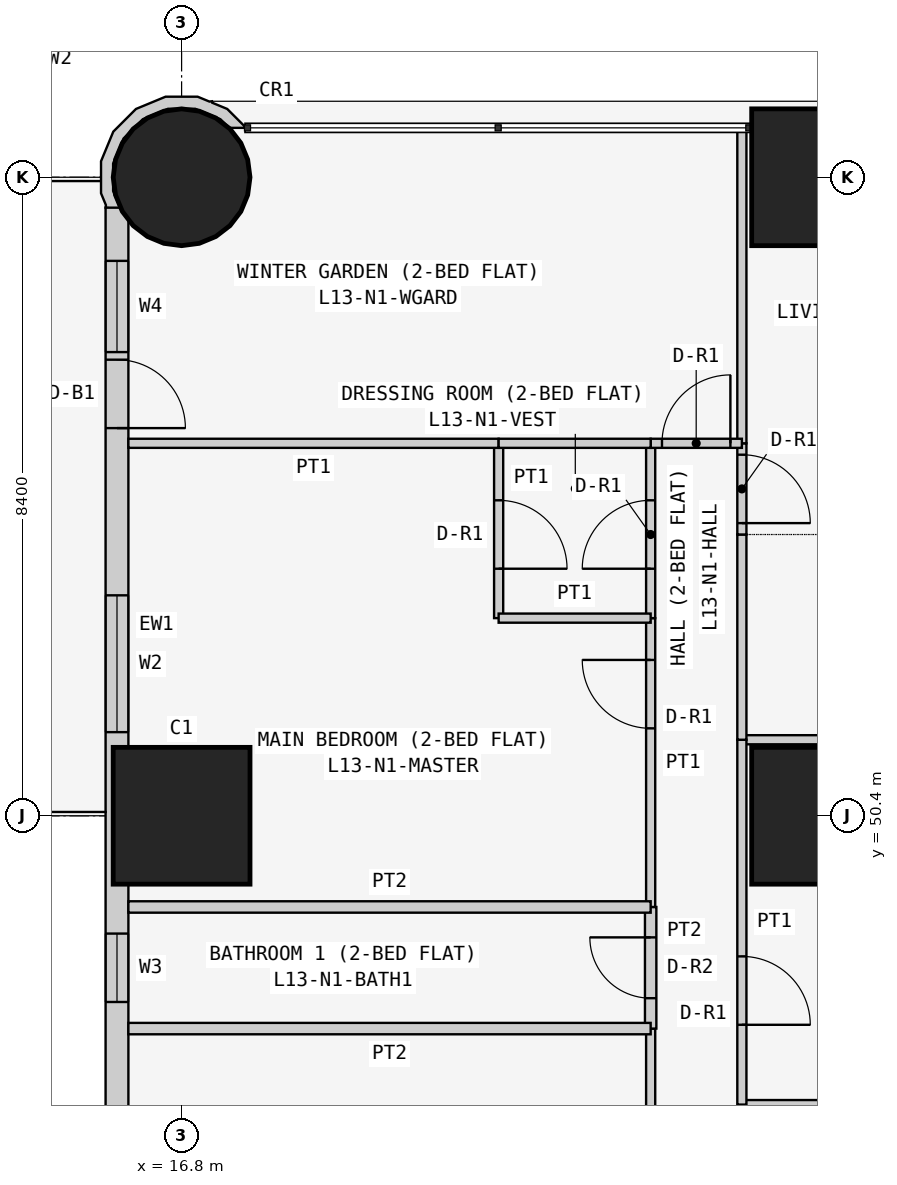
"""IFC4 building model, lengths in metres.
Left out: names, types, materials, properties, quantities, classifications, styles, units other than length and angle.
Written with IfcOpenShell. Run it as: python <this file> out.ifc"""

import sys

from ifc_helpers import new_model, si_unit, direction, frame, frame_2d, origin, origin_2d, place, context, subcontext, project, spatial, polyline, rectangle, circle, outline, extrude, element, fill, save


model = new_model("IFC4")
c1 = context("Model", 3, precision=1e-05, world=origin(), true_north=direction((0.0, 1.0)))
c2 = subcontext(c1, "Body", "Model", "MODEL_VIEW")
j1 = project(units=[si_unit("LENGTHUNIT", "METRE"), si_unit("PLANEANGLEUNIT", "RADIAN")], contexts=[c1])
p1 = place(None, origin())
s1 = spatial("IfcSite", under=j1, at=p1, CompositionType="ELEMENT")
p2 = place(p1, origin())
s2 = spatial("IfcBuilding", under=s1, at=p2, CompositionType="ELEMENT")
p3 = place(p2, frame((0.0, 0.0, 56.1)))
s3 = spatial("IfcBuildingStorey", under=s2, at=p3, CompositionType="ELEMENT", Elevation=56.1)
p4 = place(p3, frame((16.8, 50.4, 0.0), z_axis=(0.0, 0.0, 1.0), x_axis=(1.0, 0.0, 0.0)))
e1 = element("IfcColumn", 1, at=p4, inside=s3, PredefinedType="COLUMN", context=c2, shape_type="SweptSolid", body=[
    extrude(rectangle(XDim=1.8, YDim=1.8, at=origin_2d()), origin(), (0.0, 0.0, 1.0), 3.6),
])
p5 = place(p3, frame((16.8, 58.8, 0.0), z_axis=(0.0, 0.0, 1.0), x_axis=(1.0, 0.0, 0.0)))
e2 = element("IfcColumn", 2, at=p5, inside=s3, PredefinedType="COLUMN", context=c2, shape_type="SweptSolid", body=[
    extrude(circle(Radius=0.9, at=origin_2d()), origin(), (0.0, 0.0, 1.0), 3.6),
])
for number, where, z_axis, x_axis in (
    (3, (25.2, 50.4, 0.0), (0.0, 0.0, 1.0), (1.0, 0.0, 0.0)),
    (4, (25.2, 58.8, 0.0), (0.0, 0.0, 1.0), (1.0, 0.0, 0.0)),
):
    element("IfcColumn", number, at=place(p3, frame(where, z_axis=z_axis, x_axis=x_axis)), inside=s3, PredefinedType="COLUMN", context=c2, shape_type="SweptSolid", body=[
        extrude(rectangle(XDim=1.8, YDim=1.8, at=origin_2d()), origin(), (0.0, 0.0, 1.0), 3.6),
    ])
p6 = place(p3, frame((15.95, 58.4, 0.0), z_axis=(0.0, 0.0, 1.0), x_axis=(0.0, -1.0, 0.0)))
e5 = element("IfcWall", 5, at=p6, inside=s3, PredefinedType="SOLIDWALL", context=c2, shape_type="SweptSolid", body=[
    extrude(rectangle(XDim=15.7, YDim=0.3, at=frame_2d((7.85, 0.0))), origin(), (0.0, 0.0, 1.0), 3.45),
])
p7 = place(p6, frame((12.4, 0.0, 0.9)))
e6 = element("IfcOpeningElement", 6, at=p7, cuts=e5, PredefinedType="OPENING", context=c2, shape_type="SweptSolid", body=[
    extrude(rectangle(XDim=1.8, YDim=1.5, at=frame_2d((0.9, 0.75))), frame((0.0, 0.16, 0.0), z_axis=(0.0, -1.0, 0.0), x_axis=(1.0, 0.0, 0.0)), (0.0, 0.0, 1.0), 0.32),
])
p8 = place(p6, frame((9.55, 0.0, 1.5)))
e7 = element("IfcOpeningElement", 7, at=p8, cuts=e5, PredefinedType="OPENING", context=c2, shape_type="SweptSolid", body=[
    extrude(rectangle(XDim=0.9, YDim=0.7, at=frame_2d((0.45, 0.35))), frame((0.0, 0.16, 0.0), z_axis=(0.0, -1.0, 0.0), x_axis=(1.0, 0.0, 0.0)), (0.0, 0.0, 1.0), 0.32),
])
p9 = place(p6, frame((5.1, 0.0, 0.9)))
e8 = element("IfcOpeningElement", 8, at=p9, cuts=e5, PredefinedType="OPENING", context=c2, shape_type="SweptSolid", body=[
    extrude(rectangle(XDim=1.8, YDim=1.5, at=frame_2d((0.9, 0.75))), frame((0.0, 0.16, 0.0), z_axis=(0.0, -1.0, 0.0), x_axis=(1.0, 0.0, 0.0)), (0.0, 0.0, 1.0), 0.32),
])
p10 = place(p6, frame((2.0, 0.0, 0.0)))
e9 = element("IfcOpeningElement", 9, at=p10, cuts=e5, PredefinedType="OPENING", context=c2, shape_type="SweptSolid", body=[
    extrude(rectangle(XDim=0.9, YDim=2.4, at=frame_2d((0.45, 1.2))), frame((0.0, 0.16, 0.0), z_axis=(0.0, -1.0, 0.0), x_axis=(1.0, 0.0, 0.0)), (0.0, 0.0, 1.0), 0.32),
])
p11 = place(p6, frame((0.7, 0.0, 0.9)))
e10 = element("IfcOpeningElement", 10, at=p11, cuts=e5, PredefinedType="OPENING", context=c2, shape_type="SweptSolid", body=[
    extrude(rectangle(XDim=1.2, YDim=1.5, at=frame_2d((0.6, 0.75))), frame((0.0, 0.16, 0.0), z_axis=(0.0, -1.0, 0.0), x_axis=(1.0, 0.0, 0.0)), (0.0, 0.0, 1.0), 0.32),
])
p12 = place(p3, frame((17.567, 59.411, 0.0), z_axis=(0.0, 0.0, 1.0), x_axis=(-0.377204953059, 0.926129809145, 0.0)))
e11 = element("IfcWall", 11, at=p12, inside=s3, PredefinedType="SOLIDWALL", context=c2, shape_type="SweptSolid", body=[
    extrude(outline(polyline([(-0.27, 2.017), (-0.37, 1.841), (-0.102, 1.842), (0.23, 1.707), (0.484, 1.455), (0.624, 1.125), (0.626, 0.766), (0.491, 0.434), (0.239, 0.18), (0.09, 0.117), (0.011, -0.078), (0.024, -0.083), (0.329, 0.045), (0.48, 0.198), (0.499, 0.193), (0.508, 0.225), (0.626, 0.345), (0.785, 0.736), (0.782, 1.157), (0.619, 1.546), (0.319, 1.842), (-0.072, 2.002), (-0.24, 2.0), (-0.27, 2.017)])), origin(), (0.0, 0.0, 1.0), 3.45),
])
for number, where, z_axis, x_axis in (
    (12, (29.4, 46.6, 0.0), (0.0, 0.0, 1.0), (-1.0, 0.0, 0.0)),
    (13, (29.4, 51.4, 0.0), (0.0, 0.0, 1.0), (-1.0, 0.0, 0.0)),
):
    element("IfcWall", number, at=place(p3, frame(where, z_axis=z_axis, x_axis=x_axis)), inside=s3, PredefinedType="PARTITIONING", context=c2, shape_type="SweptSolid", body=[
        extrude(rectangle(XDim=5.229, YDim=0.12, at=frame_2d((2.615, 0.0))), origin(), (0.0, 0.0, 1.0), 3.45),
    ])
p13 = place(p3, frame((24.171, 51.4, 0.0), z_axis=(0.0, 0.0, 1.0), x_axis=(0.0, -1.0, 0.0)))
e14 = element("IfcWall", 14, at=p13, inside=s3, PredefinedType="PARTITIONING", context=c2, shape_type="SweptSolid", body=[
    extrude(rectangle(XDim=4.8, YDim=0.12, at=frame_2d((2.4, 0.0))), origin(), (0.0, 0.0, 1.0), 3.45),
])
p14 = place(p13, frame((2.85, 0.0, 0.0)))
e15 = element("IfcOpeningElement", 15, at=p14, cuts=e14, PredefinedType="OPENING", context=c2, shape_type="SweptSolid", body=[
    extrude(rectangle(XDim=0.9, YDim=2.1, at=frame_2d((0.45, 1.05))), frame((0.0, 0.07, 0.0), z_axis=(0.0, -1.0, 0.0), x_axis=(1.0, 0.0, 0.0)), (0.0, 0.0, 1.0), 0.14),
])
p15 = place(p3, frame((24.171, 54.1, 0.0), z_axis=(0.0, 0.0, 1.0), x_axis=(0.0, -1.0, 0.0)))
e16 = element("IfcWall", 16, at=p15, inside=s3, PredefinedType="PARTITIONING", context=c2, shape_type="SweptSolid", body=[
    extrude(rectangle(XDim=2.7, YDim=0.12, at=frame_2d((1.35, 0.0))), origin(), (0.0, 0.0, 1.0), 3.45),
])
p16 = place(p3, frame((24.171, 55.3, 0.0), z_axis=(0.0, 0.0, 1.0), x_axis=(0.0, -1.0, 0.0)))
e17 = element("IfcWall", 17, at=p16, inside=s3, PredefinedType="PARTITIONING", context=c2, shape_type="SweptSolid", body=[
    extrude(rectangle(XDim=1.2, YDim=0.12, at=frame_2d((0.6, 0.0))), origin(), (0.0, 0.0, 1.0), 3.45),
])
p17 = place(p16, frame((0.15, 0.0, 0.0)))
e18 = element("IfcOpeningElement", 18, at=p17, cuts=e17, PredefinedType="OPENING", context=c2, shape_type="SweptSolid", body=[
    extrude(rectangle(XDim=0.9, YDim=2.1, at=frame_2d((0.45, 1.05))), frame((0.0, 0.07, 0.0), z_axis=(0.0, -1.0, 0.0), x_axis=(1.0, 0.0, 0.0)), (0.0, 0.0, 1.0), 0.14),
])
p18 = place(p3, frame((24.171, 59.45, 0.0), z_axis=(0.0, 0.0, 1.0), x_axis=(0.0, -1.0, 0.0)))
e19 = element("IfcWall", 19, at=p18, inside=s3, PredefinedType="PARTITIONING", context=c2, shape_type="SweptSolid", body=[
    extrude(rectangle(XDim=4.15, YDim=0.12, at=frame_2d((2.075, 0.0))), origin(), (0.0, 0.0, 1.0), 3.45),
])
p19 = place(p3, frame((22.971, 47.6, 0.0), z_axis=(0.0, 0.0, 1.0), x_axis=(0.0, -1.0, 0.0)))
e20 = element("IfcWall", 20, at=p19, inside=s3, PredefinedType="PARTITIONING", context=c2, shape_type="SweptSolid", body=[
    extrude(rectangle(XDim=4.575, YDim=0.12, at=frame_2d((2.288, 0.0))), origin(), (0.0, 0.0, 1.0), 3.45),
])
p20 = place(p19, frame((1.85, 0.0, 0.0)))
e21 = element("IfcOpeningElement", 21, at=p20, cuts=e20, PredefinedType="OPENING", context=c2, shape_type="SweptSolid", body=[
    extrude(rectangle(XDim=0.9, YDim=2.1, at=frame_2d((0.45, 1.05))), frame((0.0, 0.07, 0.0), z_axis=(0.0, -1.0, 0.0), x_axis=(1.0, 0.0, 0.0)), (0.0, 0.0, 1.0), 0.14),
])
p21 = place(p3, frame((22.971, 49.2, 0.0), z_axis=(0.0, 0.0, 1.0), x_axis=(0.0, -1.0, 0.0)))
e22 = element("IfcWall", 22, at=p21, inside=s3, PredefinedType="PARTITIONING", context=c2, shape_type="SweptSolid", body=[
    extrude(rectangle(XDim=1.6, YDim=0.15, at=frame_2d((0.8, 0.0))), origin(), (0.0, 0.0, 1.0), 3.45),
])
p22 = place(p21, frame((0.4, 0.0, 0.0)))
e23 = element("IfcOpeningElement", 23, at=p22, cuts=e22, PredefinedType="OPENING", context=c2, shape_type="SweptSolid", body=[
    extrude(rectangle(XDim=0.8, YDim=2.1, at=frame_2d((0.4, 1.05))), frame((0.0, 0.085, 0.0), z_axis=(0.0, -1.0, 0.0), x_axis=(1.0, 0.0, 0.0)), (0.0, 0.0, 1.0), 0.17),
])
p23 = place(p3, frame((22.971, 53.0, 0.0), z_axis=(0.0, 0.0, 1.0), x_axis=(0.0, -1.0, 0.0)))
e24 = element("IfcWall", 24, at=p23, inside=s3, PredefinedType="PARTITIONING", context=c2, shape_type="SweptSolid", body=[
    extrude(rectangle(XDim=3.8, YDim=0.12, at=frame_2d((1.9, 0.0))), origin(), (0.0, 0.0, 1.0), 3.45),
])
p24 = place(p23, frame((0.55, 0.0, 0.0)))
e25 = element("IfcOpeningElement", 25, at=p24, cuts=e24, PredefinedType="OPENING", context=c2, shape_type="SweptSolid", body=[
    extrude(rectangle(XDim=0.9, YDim=2.1, at=frame_2d((0.45, 1.05))), frame((0.0, 0.07, 0.0), z_axis=(0.0, -1.0, 0.0), x_axis=(1.0, 0.0, 0.0)), (0.0, 0.0, 1.0), 0.14),
])
p25 = place(p3, frame((22.971, 55.3, 0.0), z_axis=(0.0, 0.0, 1.0), x_axis=(0.0, -1.0, 0.0)))
e26 = element("IfcWall", 26, at=p25, inside=s3, PredefinedType="PARTITIONING", context=c2, shape_type="SweptSolid", body=[
    extrude(rectangle(XDim=2.3, YDim=0.12, at=frame_2d((1.15, 0.0))), origin(), (0.0, 0.0, 1.0), 3.45),
])
p26 = place(p25, frame((0.75, 0.0, 0.0)))
e27 = element("IfcOpeningElement", 27, at=p26, cuts=e26, PredefinedType="OPENING", context=c2, shape_type="SweptSolid", body=[
    extrude(rectangle(XDim=0.9, YDim=2.1, at=frame_2d((0.45, 1.05))), frame((0.0, 0.07, 0.0), z_axis=(0.0, -1.0, 0.0), x_axis=(1.0, 0.0, 0.0)), (0.0, 0.0, 1.0), 0.14),
])
p27 = place(p3, frame((24.171, 55.3, 0.0), z_axis=(0.0, 0.0, 1.0), x_axis=(-1.0, 0.0, 0.0)))
e28 = element("IfcWall", 28, at=p27, inside=s3, PredefinedType="PARTITIONING", context=c2, shape_type="SweptSolid", body=[
    extrude(rectangle(XDim=1.2, YDim=0.12, at=frame_2d((0.6, 0.0))), origin(), (0.0, 0.0, 1.0), 3.45),
])
p28 = place(p27, frame((0.151, 0.0, 0.0)))
e29 = element("IfcOpeningElement", 29, at=p28, cuts=e28, PredefinedType="OPENING", context=c2, shape_type="SweptSolid", body=[
    extrude(rectangle(XDim=0.9, YDim=2.1, at=frame_2d((0.45, 1.05))), frame((0.0, 0.07, 0.0), z_axis=(0.0, -1.0, 0.0), x_axis=(1.0, 0.0, 0.0)), (0.0, 0.0, 1.0), 0.14),
])
for number, where, z_axis, x_axis in (
    (30, (22.971, 47.6, 0.0), (0.0, 0.0, 1.0), (-1.0, 0.0, 0.0)),
    (31, (22.971, 49.2, 0.0), (0.0, 0.0, 1.0), (-1.0, 0.0, 0.0)),
):
    element("IfcWall", number, at=place(p3, frame(where, z_axis=z_axis, x_axis=x_axis)), inside=s3, PredefinedType="PARTITIONING", context=c2, shape_type="SweptSolid", body=[
        extrude(rectangle(XDim=6.871, YDim=0.15, at=frame_2d((3.436, 0.0))), origin(), (0.0, 0.0, 1.0), 3.45),
    ])
p29 = place(p3, frame((20.971, 55.3, 0.0), z_axis=(0.0, 0.0, 1.0), x_axis=(0.0, -1.0, 0.0)))
e32 = element("IfcWall", 32, at=p29, inside=s3, PredefinedType="PARTITIONING", context=c2, shape_type="SweptSolid", body=[
    extrude(rectangle(XDim=2.3, YDim=0.12, at=frame_2d((1.15, 0.0))), origin(), (0.0, 0.0, 1.0), 2.848),
])
p30 = place(p29, frame((0.75, 0.0, 0.0)))
e33 = element("IfcOpeningElement", 33, at=p30, cuts=e32, PredefinedType="OPENING", context=c2, shape_type="SweptSolid", body=[
    extrude(rectangle(XDim=0.9, YDim=2.1, at=frame_2d((0.45, 1.05))), frame((0.0, 0.07, 0.0), z_axis=(0.0, -1.0, 0.0), x_axis=(1.0, 0.0, 0.0)), (0.0, 0.0, 1.0), 0.14),
])
p31 = place(p3, frame((20.971, 53.0, 0.0), z_axis=(0.0, 0.0, 1.0), x_axis=(1.0, 0.0, 0.0)))
e34 = element("IfcWall", 34, at=p31, inside=s3, PredefinedType="PARTITIONING", context=c2, shape_type="SweptSolid", body=[
    extrude(rectangle(XDim=2.0, YDim=0.12, at=frame_2d((1.0, 0.0))), origin(), (0.0, 0.0, 1.0), 3.45),
])
p32 = place(p3, frame((16.1, 55.3, 0.0), z_axis=(0.0, 0.0, 1.0), x_axis=(1.0, 0.0, 0.0)))
e35 = element("IfcWall", 35, at=p32, inside=s3, PredefinedType="PARTITIONING", context=c2, shape_type="SweptSolid", body=[
    extrude(rectangle(XDim=4.871, YDim=0.12, at=frame_2d((2.436, 0.0))), origin(), (0.0, 0.0, 1.0), 3.45),
])
p33 = place(p3, frame((22.971, 55.3, 0.0), z_axis=(0.0, 0.0, 1.0), x_axis=(-1.0, 0.0, 0.0)))
e36 = element("IfcWall", 36, at=p33, inside=s3, PredefinedType="PARTITIONING", context=c2, shape_type="SweptSolid", body=[
    extrude(rectangle(XDim=2.0, YDim=0.12, at=frame_2d((1.0, 0.0))), origin(), (0.0, 0.0, 1.0), 3.45),
])
p34 = place(p8, origin())
e37 = element("IfcWindow", 37, at=p34, inside=s3, PartitioningType="SINGLE_PANEL", PredefinedType="WINDOW", context=c2, shape_type="SweptSolid", body=[
    extrude(rectangle(XDim=0.9, YDim=0.7, at=frame_2d((0.45, 0.35))), frame((0.0, 0.03, 0.0), z_axis=(0.0, -1.0, 0.0), x_axis=(1.0, 0.0, 0.0)), (0.0, 0.0, 1.0), 0.06),
])
fill(e7, e37)
p35 = place(p9, origin())
e38 = element("IfcWindow", 38, at=p35, inside=s3, PartitioningType="SINGLE_PANEL", PredefinedType="WINDOW", context=c2, shape_type="SweptSolid", body=[
    extrude(rectangle(XDim=1.8, YDim=1.5, at=frame_2d((0.9, 0.75))), frame((0.0, 0.03, 0.0), z_axis=(0.0, -1.0, 0.0), x_axis=(1.0, 0.0, 0.0)), (0.0, 0.0, 1.0), 0.06),
])
fill(e8, e38)
p36 = place(p10, origin())
e39 = element("IfcDoor", 39, at=p36, inside=s3, OperationType="SINGLE_SWING_RIGHT", PredefinedType="DOOR", context=c2, shape_type="SweptSolid", body=[
    extrude(rectangle(XDim=0.9, YDim=2.4, at=frame_2d((0.45, 1.2))), frame((0.0, 0.025, 0.0), z_axis=(0.0, -1.0, 0.0), x_axis=(1.0, 0.0, 0.0)), (0.0, 0.0, 1.0), 0.05),
])
fill(e9, e39)
p37 = place(p11, origin())
e40 = element("IfcWindow", 40, at=p37, inside=s3, PartitioningType="SINGLE_PANEL", PredefinedType="WINDOW", context=c2, shape_type="SweptSolid", body=[
    extrude(rectangle(XDim=1.2, YDim=1.5, at=frame_2d((0.6, 0.75))), frame((0.0, 0.03, 0.0), z_axis=(0.0, -1.0, 0.0), x_axis=(1.0, 0.0, 0.0)), (0.0, 0.0, 1.0), 0.06),
])
fill(e10, e40)
p38 = place(p14, origin())
e41 = element("IfcDoor", 41, at=p38, inside=s3, OperationType="SINGLE_SWING_RIGHT", PredefinedType="DOOR", context=c2, shape_type="SweptSolid", body=[
    extrude(rectangle(XDim=0.9, YDim=2.1, at=frame_2d((0.45, 1.05))), frame((0.0, 0.025, 0.0), z_axis=(0.0, -1.0, 0.0), x_axis=(1.0, 0.0, 0.0)), (0.0, 0.0, 1.0), 0.05),
])
fill(e15, e41)
p39 = place(p17, origin())
e42 = element("IfcDoor", 42, at=p39, inside=s3, OperationType="SINGLE_SWING_RIGHT", PredefinedType="DOOR", context=c2, shape_type="SweptSolid", body=[
    extrude(rectangle(XDim=0.9, YDim=2.1, at=frame_2d((0.45, 1.05))), frame((0.0, 0.025, 0.0), z_axis=(0.0, -1.0, 0.0), x_axis=(1.0, 0.0, 0.0)), (0.0, 0.0, 1.0), 0.05),
])
fill(e18, e42)
p40 = place(p22, frame((0.8, 0.0, 0.0), z_axis=(0.0, 0.0, 1.0), x_axis=(-1.0, 0.0, 0.0)))
e43 = element("IfcDoor", 43, at=p40, inside=s3, OperationType="SINGLE_SWING_RIGHT", PredefinedType="DOOR", context=c2, shape_type="SweptSolid", body=[
    extrude(rectangle(XDim=0.8, YDim=2.1, at=frame_2d((0.4, 1.05))), frame((0.0, 0.025, 0.0), z_axis=(0.0, -1.0, 0.0), x_axis=(1.0, 0.0, 0.0)), (0.0, 0.0, 1.0), 0.05),
])
fill(e23, e43)
p41 = place(p24, frame((0.9, 0.0, 0.0), z_axis=(0.0, 0.0, 1.0), x_axis=(-1.0, 0.0, 0.0)))
e44 = element("IfcDoor", 44, at=p41, inside=s3, OperationType="SINGLE_SWING_RIGHT", PredefinedType="DOOR", context=c2, shape_type="SweptSolid", body=[
    extrude(rectangle(XDim=0.9, YDim=2.1, at=frame_2d((0.45, 1.05))), frame((0.0, 0.025, 0.0), z_axis=(0.0, -1.0, 0.0), x_axis=(1.0, 0.0, 0.0)), (0.0, 0.0, 1.0), 0.05),
])
fill(e25, e44)
p42 = place(p26, frame((0.9, 0.0, 0.0), z_axis=(0.0, 0.0, 1.0), x_axis=(-1.0, 0.0, 0.0)))
e45 = element("IfcDoor", 45, at=p42, inside=s3, OperationType="SINGLE_SWING_LEFT", PredefinedType="DOOR", context=c2, shape_type="SweptSolid", body=[
    extrude(rectangle(XDim=0.9, YDim=2.1, at=frame_2d((0.45, 1.05))), frame((0.0, 0.025, 0.0), z_axis=(0.0, -1.0, 0.0), x_axis=(1.0, 0.0, 0.0)), (0.0, 0.0, 1.0), 0.05),
])
fill(e27, e45)
p43 = place(p30, origin())
e46 = element("IfcDoor", 46, at=p43, inside=s3, OperationType="SINGLE_SWING_RIGHT", PredefinedType="DOOR", context=c2, shape_type="SweptSolid", body=[
    extrude(rectangle(XDim=0.9, YDim=2.1, at=frame_2d((0.45, 1.05))), frame((0.0, 0.025, 0.0), z_axis=(0.0, -1.0, 0.0), x_axis=(1.0, 0.0, 0.0)), (0.0, 0.0, 1.0), 0.05),
])
fill(e33, e46)
p44 = place(p28, frame((0.9, 0.0, 0.0), z_axis=(0.0, 0.0, 1.0), x_axis=(-1.0, 0.0, 0.0)))
e47 = element("IfcDoor", 47, at=p44, inside=s3, OperationType="SINGLE_SWING_RIGHT", PredefinedType="DOOR", context=c2, shape_type="SweptSolid", body=[
    extrude(rectangle(XDim=0.9, YDim=2.1, at=frame_2d((0.45, 1.05))), frame((0.0, 0.025, 0.0), z_axis=(0.0, -1.0, 0.0), x_axis=(1.0, 0.0, 0.0)), (0.0, 0.0, 1.0), 0.05),
])
fill(e29, e47)
save(model, sys.argv[1])
